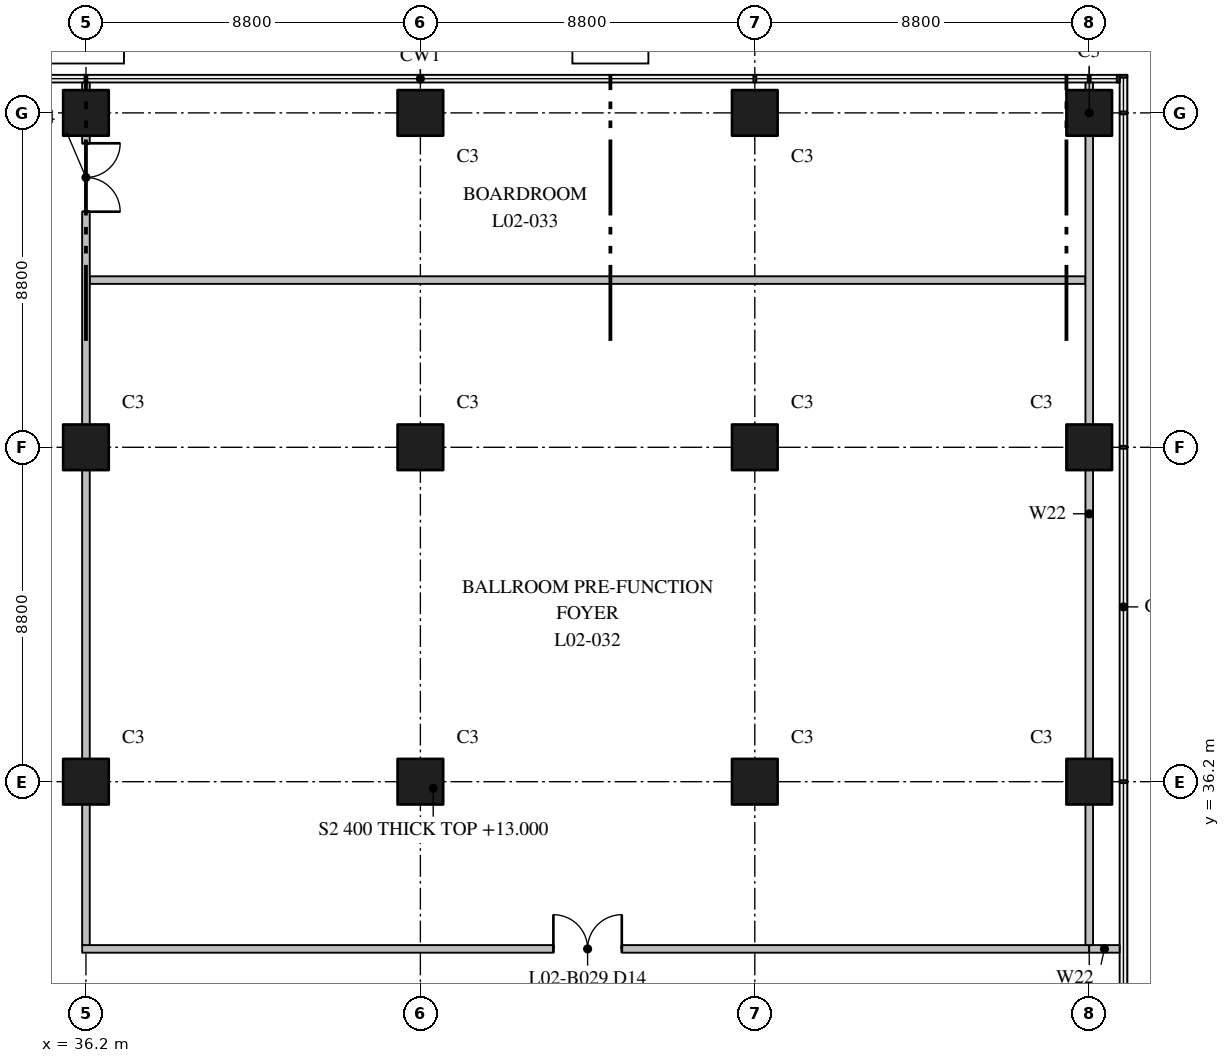
"""IFC4 building model, lengths in metres.
Left out: names, types, materials, properties, quantities, classifications, styles, units other than length and angle.
Written with IfcOpenShell. Run it as: python <this file> out.ifc"""

import sys

from ifc_helpers import new_model, si_unit, direction, frame, frame_2d, origin, origin_2d, place, context, subcontext, project, spatial, rectangle, extrude, element, fill, save


model = new_model("IFC4")
c1 = context("Model", 3, precision=1e-05, world=origin(), true_north=direction((0.0, 1.0)))
c2 = subcontext(c1, "Body", "Model", "MODEL_VIEW")
j1 = project(units=[si_unit("LENGTHUNIT", "METRE"), si_unit("PLANEANGLEUNIT", "RADIAN")], contexts=[c1])
p1 = place(None, origin())
s1 = spatial("IfcSite", under=j1, at=p1, CompositionType="ELEMENT")
p2 = place(p1, origin())
s2 = spatial("IfcBuilding", under=s1, at=p2, CompositionType="ELEMENT")
p3 = place(p2, frame((0.0, 0.0, 13.0)))
s3 = spatial("IfcBuildingStorey", under=s2, at=p3, CompositionType="ELEMENT", Elevation=13.0)
for number, where, z_axis, x_axis in (
    (1, (36.2, 36.2, 0.0), (0.0, 0.0, 1.0), (1.0, 0.0, 0.0)),
    (2, (36.2, 45.0, 0.0), (0.0, 0.0, 1.0), (1.0, 0.0, 0.0)),
    (3, (36.2, 53.8, 0.0), (0.0, 0.0, 1.0), (1.0, 0.0, 0.0)),
    (4, (45.0, 36.2, 0.0), (0.0, 0.0, 1.0), (1.0, 0.0, 0.0)),
    (5, (45.0, 45.0, 0.0), (0.0, 0.0, 1.0), (1.0, 0.0, 0.0)),
    (6, (45.0, 53.8, 0.0), (0.0, 0.0, 1.0), (1.0, 0.0, 0.0)),
    (7, (53.8, 36.2, 0.0), (0.0, 0.0, 1.0), (1.0, 0.0, 0.0)),
    (8, (53.8, 45.0, 0.0), (0.0, 0.0, 1.0), (1.0, 0.0, 0.0)),
    (9, (53.8, 53.8, 0.0), (0.0, 0.0, 1.0), (1.0, 0.0, 0.0)),
    (10, (62.6, 36.2, 0.0), (0.0, 0.0, 1.0), (1.0, 0.0, 0.0)),
    (11, (62.6, 45.0, 0.0), (0.0, 0.0, 1.0), (1.0, 0.0, 0.0)),
    (12, (62.6, 53.8, 0.0), (0.0, 0.0, 1.0), (1.0, 0.0, 0.0)),
):
    element("IfcColumn", number, at=place(p3, frame(where, z_axis=z_axis, x_axis=x_axis)), inside=s3, PredefinedType="COLUMN", context=c2, shape_type="SweptSolid", body=[
        extrude(rectangle(XDim=1.2, YDim=1.2, at=origin_2d()), origin(), (0.0, 0.0, 1.0), 5.0),
    ])
p4 = place(p3, frame((36.1, 31.8, 0.0), z_axis=(0.0, 0.0, 1.0), x_axis=(1.0, 0.0, 0.0)))
e13 = element("IfcWall", 13, at=p4, inside=s3, PredefinedType="PARTITIONING", context=c2, shape_type="SweptSolid", body=[
    extrude(rectangle(XDim=26.5, YDim=0.2, at=frame_2d((13.25, 0.0))), origin(), (0.0, 0.0, 1.0), 4.6),
])
p5 = place(p4, frame((12.4, 0.0, 0.0)))
e14 = element("IfcOpeningElement", 14, at=p5, cuts=e13, PredefinedType="OPENING", context=c2, shape_type="SweptSolid", body=[
    extrude(rectangle(XDim=1.8, YDim=2.4, at=frame_2d((0.9, 1.2))), frame((0.0, 0.11, 0.0), z_axis=(0.0, -1.0, 0.0), x_axis=(1.0, 0.0, 0.0)), (0.0, 0.0, 1.0), 0.22),
])
p6 = place(p3, frame((62.6, 31.8, 0.0), z_axis=(0.0, 0.0, 1.0), x_axis=(1.0, 0.0, 0.0)))
e15 = element("IfcWall", 15, at=p6, inside=s3, PredefinedType="PARTITIONING", context=c2, shape_type="SweptSolid", body=[
    extrude(rectangle(XDim=0.8, YDim=0.2, at=frame_2d((0.4, 0.0))), origin(), (0.0, 0.0, 1.0), 4.6),
])
p7 = place(p3, frame((36.3, 49.4, 0.0), z_axis=(0.0, 0.0, 1.0), x_axis=(1.0, 0.0, 0.0)))
e16 = element("IfcWall", 16, at=p7, inside=s3, PredefinedType="PARTITIONING", context=c2, shape_type="SweptSolid", body=[
    extrude(rectangle(XDim=26.2, YDim=0.2, at=frame_2d((13.1, 0.0))), origin(), (0.0, 0.0, 1.0), 4.6),
])
p8 = place(p3, frame((36.2, 31.9, 0.0), z_axis=(0.0, 0.0, 1.0), x_axis=(0.0, 1.0, 0.0)))
e17 = element("IfcWall", 17, at=p8, inside=s3, PredefinedType="PARTITIONING", context=c2, shape_type="SweptSolid", body=[
    extrude(rectangle(XDim=22.7, YDim=0.2, at=frame_2d((11.35, 0.0))), origin(), (0.0, 0.0, 1.0), 4.6),
])
p9 = place(p8, frame((19.3, 0.0, 0.0)))
e18 = element("IfcOpeningElement", 18, at=p9, cuts=e17, PredefinedType="OPENING", context=c2, shape_type="SweptSolid", body=[
    extrude(rectangle(XDim=1.8, YDim=2.4, at=frame_2d((0.9, 1.2))), frame((0.0, 0.11, 0.0), z_axis=(0.0, -1.0, 0.0), x_axis=(1.0, 0.0, 0.0)), (0.0, 0.0, 1.0), 0.22),
])
p10 = place(p3, frame((62.6, 31.9, 0.0), z_axis=(0.0, 0.0, 1.0), x_axis=(0.0, 1.0, 0.0)))
e19 = element("IfcWall", 19, at=p10, inside=s3, PredefinedType="PARTITIONING", context=c2, shape_type="SweptSolid", body=[
    extrude(rectangle(XDim=22.7, YDim=0.2, at=frame_2d((11.35, 0.0))), origin(), (0.0, 0.0, 1.0), 4.6),
])
p11 = place(p5, origin())
e20 = element("IfcDoor", 20, at=p11, inside=s3, OperationType="DOUBLE_DOOR_SINGLE_SWING", PredefinedType="DOOR", context=c2, shape_type="SweptSolid", body=[
    extrude(rectangle(XDim=1.8, YDim=2.4, at=frame_2d((0.9, 1.2))), frame((0.0, 0.025, 0.0), z_axis=(0.0, -1.0, 0.0), x_axis=(1.0, 0.0, 0.0)), (0.0, 0.0, 1.0), 0.05),
])
fill(e14, e20)
p12 = place(p9, frame((1.8, 0.0, 0.0), z_axis=(0.0, 0.0, 1.0), x_axis=(-1.0, 0.0, 0.0)))
e21 = element("IfcDoor", 21, at=p12, inside=s3, OperationType="DOUBLE_DOOR_SINGLE_SWING", PredefinedType="DOOR", context=c2, shape_type="SweptSolid", body=[
    extrude(rectangle(XDim=1.8, YDim=2.4, at=frame_2d((0.9, 1.2))), frame((0.0, 0.025, 0.0), z_axis=(0.0, -1.0, 0.0), x_axis=(1.0, 0.0, 0.0)), (0.0, 0.0, 1.0), 0.05),
])
fill(e18, e21)
save(model, sys.argv[1])
